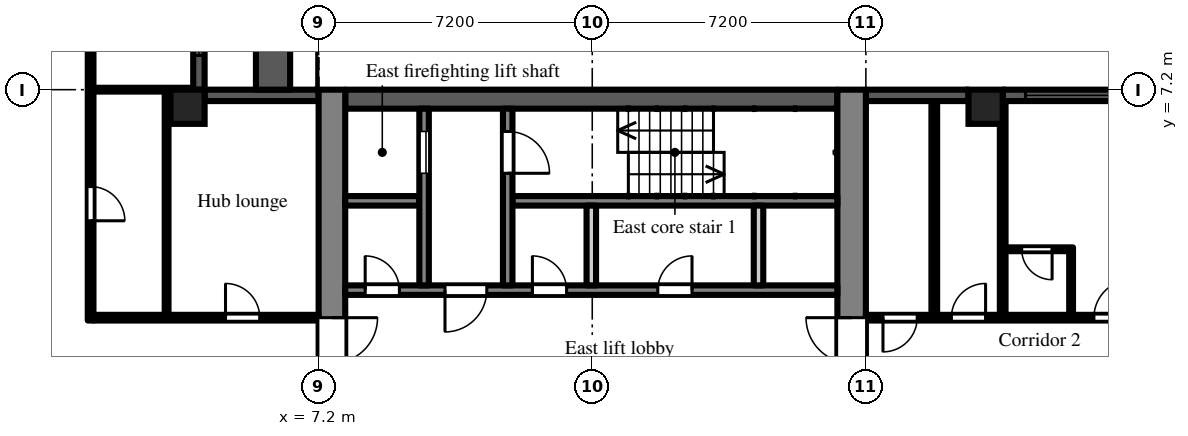
"""IFC4 building model, lengths in metres.
Left out: names, types, materials, properties, quantities, classifications, styles, units other than length and angle.
Written with IfcOpenShell. Run it as: python <this file> out.ifc"""

import sys

from ifc_helpers import new_model, si_unit, direction, frame, frame_2d, origin, origin_2d, place, context, subcontext, project, spatial, rectangle, extrude, element, fill, save


model = new_model("IFC4")
c1 = context("Model", 3, precision=1e-05, world=origin(), true_north=direction((0.0, 1.0)))
c2 = subcontext(c1, "Body", "Model", "MODEL_VIEW")
j1 = project(units=[si_unit("LENGTHUNIT", "METRE"), si_unit("PLANEANGLEUNIT", "RADIAN")], contexts=[c1])
p1 = place(None, origin())
s1 = spatial("IfcSite", under=j1, at=p1, CompositionType="ELEMENT")
p2 = place(p1, origin())
s2 = spatial("IfcBuilding", under=s1, at=p2, CompositionType="ELEMENT")
p3 = place(p2, frame((0.0, 0.0, 75.9)))
s3 = spatial("IfcBuildingStorey", under=s2, at=p3, CompositionType="ELEMENT", Elevation=75.9)
for number, where, z_axis, x_axis in (
    (1, (3.75, 6.75, 0.0), (0.0, 0.0, 1.0), (1.0, 0.0, 0.0)),
    (2, (24.75, 6.75, 0.0), (0.0, 0.0, 1.0), (1.0, 0.0, 0.0)),
):
    element("IfcColumn", number, at=place(p3, frame(where, z_axis=z_axis, x_axis=x_axis)), inside=s3, PredefinedType="COLUMN", context=c2, shape_type="SweptSolid", body=[
        extrude(rectangle(XDim=0.9, YDim=0.9, at=origin_2d()), origin(), (0.0, 0.0, 1.0), 3.0),
    ])
p4 = place(p3, frame((28.35, 7.05, 0.0), z_axis=(0.0, 0.0, 1.0), x_axis=(-1.0, 0.0, 0.0)))
e3 = element("IfcWall", 3, at=p4, inside=s3, PredefinedType="SOLIDWALL", context=c2, shape_type="SweptSolid", body=[
    extrude(rectangle(XDim=3.15, YDim=0.3, at=frame_2d((1.575, 0.0))), origin(), (0.0, 0.0, 1.0), 2.1),
])
p5 = place(p4, frame((0.15, 0.0, 0.2)))
e4 = element("IfcOpeningElement", 4, at=p5, cuts=e3, PredefinedType="OPENING", context=c2, shape_type="SweptSolid", body=[
    extrude(rectangle(XDim=2.4, YDim=1.85, at=frame_2d((1.2, 0.925))), frame((0.0, 0.16, 0.0), z_axis=(0.0, -1.0, 0.0), x_axis=(1.0, 0.0, 0.0)), (0.0, 0.0, 1.0), 0.32),
])
p6 = place(p3, frame((24.3, 7.05, 0.0), z_axis=(0.0, 0.0, 1.0), x_axis=(-1.0, 0.0, 0.0)))
e5 = element("IfcWall", 5, at=p6, inside=s3, PredefinedType="SOLIDWALL", context=c2, shape_type="SweptSolid", body=[
    extrude(rectangle(XDim=2.7, YDim=0.3, at=frame_2d((1.35, 0.0))), origin(), (0.0, 0.0, 1.0), 2.1),
])
p7 = place(p3, frame((7.2, 7.05, 0.0), z_axis=(0.0, 0.0, 1.0), x_axis=(-1.0, 0.0, 0.0)))
e6 = element("IfcWall", 6, at=p7, inside=s3, PredefinedType="SOLIDWALL", context=c2, shape_type="SweptSolid", body=[
    extrude(rectangle(XDim=3.0, YDim=0.3, at=frame_2d((1.5, 0.0))), origin(), (0.0, 0.0, 1.0), 2.1),
])
p8 = place(p3, frame((4.05, 7.2, 0.0), z_axis=(0.0, 0.0, 1.0), x_axis=(0.0, 1.0, 0.0)))
e7 = element("IfcWall", 7, at=p8, inside=s3, PredefinedType="SOLIDWALL", context=c2, shape_type="SweptSolid", body=[
    extrude(rectangle(XDim=7.2, YDim=0.3, at=frame_2d((3.6, 0.0))), origin(), (0.0, 0.0, 1.0), 2.1),
])
p9 = place(p8, frame((3.0, 0.0, 0.0)))
e8 = element("IfcOpeningElement", 8, at=p9, cuts=e7, PredefinedType="OPENING", context=c2, shape_type="SweptSolid", body=[
    extrude(rectangle(XDim=1.2, YDim=2.05, at=frame_2d((0.6, 1.025))), frame((0.0, 0.16, 0.0), z_axis=(0.0, -1.0, 0.0), x_axis=(1.0, 0.0, 0.0)), (0.0, 0.0, 1.0), 0.32),
])
p10 = place(p8, frame((0.9, 0.0, 0.2)))
e9 = element("IfcOpeningElement", 9, at=p10, cuts=e7, PredefinedType="OPENING", context=c2, shape_type="SweptSolid", body=[
    extrude(rectangle(XDim=1.8, YDim=1.85, at=frame_2d((0.9, 0.925))), frame((0.0, 0.16, 0.0), z_axis=(0.0, -1.0, 0.0), x_axis=(1.0, 0.0, 0.0)), (0.0, 0.0, 1.0), 0.32),
])
p11 = place(p8, frame((4.5, 0.0, 0.2)))
e10 = element("IfcOpeningElement", 10, at=p11, cuts=e7, PredefinedType="OPENING", context=c2, shape_type="SweptSolid", body=[
    extrude(rectangle(XDim=1.8, YDim=1.85, at=frame_2d((0.9, 0.925))), frame((0.0, 0.16, 0.0), z_axis=(0.0, -1.0, 0.0), x_axis=(1.0, 0.0, 0.0)), (0.0, 0.0, 1.0), 0.32),
])
p12 = place(p3, frame((6.0, 7.2, 0.0), z_axis=(0.0, 0.0, 1.0), x_axis=(0.0, 1.0, 0.0)))
e11 = element("IfcWall", 11, at=p12, inside=s3, PredefinedType="PARAPET", context=c2, shape_type="SweptSolid", body=[
    extrude(rectangle(XDim=7.2, YDim=0.9, at=frame_2d((3.6, 0.0))), origin(), (0.0, 0.0, 1.0), 0.8),
])
p13 = place(p3, frame((7.55, -7.2, 0.0), z_axis=(0.0, 0.0, 1.0), x_axis=(0.0, 1.0, 0.0)))
e12 = element("IfcWall", 12, at=p13, inside=s3, PredefinedType="SHEAR", context=c2, shape_type="SweptSolid", body=[
    extrude(rectangle(XDim=14.4, YDim=0.7, at=frame_2d((7.2, 0.0))), origin(), (0.0, 0.0, 1.0), 2.575),
])
p14 = place(p13, frame((6.0, 0.0, 0.0)))
e13 = element("IfcOpeningElement", 13, at=p14, cuts=e12, PredefinedType="OPENING", context=c2, shape_type="SweptSolid", body=[
    extrude(rectangle(XDim=2.4, YDim=2.2, at=frame_2d((1.2, 1.1))), frame((0.0, 0.36, 0.0), z_axis=(0.0, -1.0, 0.0), x_axis=(1.0, 0.0, 0.0)), (0.0, 0.0, 1.0), 0.72),
])
p15 = place(p3, frame((21.225, -7.2, 0.0), z_axis=(0.0, 0.0, 1.0), x_axis=(0.0, 1.0, 0.0)))
e14 = element("IfcWall", 14, at=p15, inside=s3, PredefinedType="SHEAR", context=c2, shape_type="SweptSolid", body=[
    extrude(rectangle(XDim=14.4, YDim=0.75, at=frame_2d((7.2, 0.0))), origin(), (0.0, 0.0, 1.0), 2.575),
])
p16 = place(p15, frame((6.0, 0.0, 0.0)))
e15 = element("IfcOpeningElement", 15, at=p16, cuts=e14, PredefinedType="OPENING", context=c2, shape_type="SweptSolid", body=[
    extrude(rectangle(XDim=2.4, YDim=2.2, at=frame_2d((1.2, 1.1))), frame((0.0, 0.385, 0.0), z_axis=(0.0, -1.0, 0.0), x_axis=(1.0, 0.0, 0.0)), (0.0, 0.0, 1.0), 0.77),
])
p17 = place(p3, frame((7.9, 6.95, 0.0), z_axis=(0.0, 0.0, 1.0), x_axis=(1.0, 0.0, 0.0)))
e16 = element("IfcWall", 16, at=p17, inside=s3, PredefinedType="SHEAR", context=c2, shape_type="SweptSolid", body=[
    extrude(rectangle(XDim=12.95, YDim=0.5, at=frame_2d((6.475, 0.0))), origin(), (0.0, 0.0, 1.0), 2.575),
])
p18 = place(p3, frame((7.9, 1.925, 0.0), z_axis=(0.0, 0.0, 1.0), x_axis=(1.0, 0.0, 0.0)))
e17 = element("IfcWall", 17, at=p18, inside=s3, PredefinedType="SHEAR", context=c2, shape_type="SweptSolid", body=[
    extrude(rectangle(XDim=12.95, YDim=0.25, at=frame_2d((6.475, 0.0))), origin(), (0.0, 0.0, 1.0), 2.575),
])
p19 = place(p18, frame((0.525, 0.0, 0.0)))
e18 = element("IfcOpeningElement", 18, at=p19, cuts=e17, PredefinedType="OPENING", context=c2, shape_type="SweptSolid", body=[
    extrude(rectangle(XDim=0.9, YDim=2.1, at=frame_2d((0.45, 1.05))), frame((0.0, 0.135, 0.0), z_axis=(0.0, -1.0, 0.0), x_axis=(1.0, 0.0, 0.0)), (0.0, 0.0, 1.0), 0.27),
])
p20 = place(p18, frame((2.625, 0.0, 0.0)))
e19 = element("IfcOpeningElement", 19, at=p20, cuts=e17, PredefinedType="OPENING", context=c2, shape_type="SweptSolid", body=[
    extrude(rectangle(XDim=1.1, YDim=2.1, at=frame_2d((0.55, 1.05))), frame((0.0, 0.135, 0.0), z_axis=(0.0, -1.0, 0.0), x_axis=(1.0, 0.0, 0.0)), (0.0, 0.0, 1.0), 0.27),
])
p21 = place(p18, frame((4.925, 0.0, 0.0)))
e20 = element("IfcOpeningElement", 20, at=p21, cuts=e17, PredefinedType="OPENING", context=c2, shape_type="SweptSolid", body=[
    extrude(rectangle(XDim=0.9, YDim=2.1, at=frame_2d((0.45, 1.05))), frame((0.0, 0.135, 0.0), z_axis=(0.0, -1.0, 0.0), x_axis=(1.0, 0.0, 0.0)), (0.0, 0.0, 1.0), 0.27),
])
p22 = place(p18, frame((8.225, 0.0, 0.0)))
e21 = element("IfcOpeningElement", 21, at=p22, cuts=e17, PredefinedType="OPENING", context=c2, shape_type="SweptSolid", body=[
    extrude(rectangle(XDim=0.9, YDim=2.1, at=frame_2d((0.45, 1.05))), frame((0.0, 0.135, 0.0), z_axis=(0.0, -1.0, 0.0), x_axis=(1.0, 0.0, 0.0)), (0.0, 0.0, 1.0), 0.27),
])
p23 = place(p3, frame((7.9, 4.275, 0.0), z_axis=(0.0, 0.0, 1.0), x_axis=(1.0, 0.0, 0.0)))
e22 = element("IfcWall", 22, at=p23, inside=s3, PredefinedType="SHEAR", context=c2, shape_type="SweptSolid", body=[
    extrude(rectangle(XDim=1.95, YDim=0.25, at=frame_2d((0.975, 0.0))), origin(), (0.0, 0.0, 1.0), 2.575),
])
p24 = place(p3, frame((12.3, 4.275, 0.0), z_axis=(0.0, 0.0, 1.0), x_axis=(1.0, 0.0, 0.0)))
e23 = element("IfcWall", 23, at=p24, inside=s3, PredefinedType="SHEAR", context=c2, shape_type="SweptSolid", body=[
    extrude(rectangle(XDim=8.55, YDim=0.25, at=frame_2d((4.275, 0.0))), origin(), (0.0, 0.0, 1.0), 2.575),
])
p25 = place(p3, frame((9.975, 2.05, 0.0), z_axis=(0.0, 0.0, 1.0), x_axis=(0.0, 1.0, 0.0)))
e24 = element("IfcWall", 24, at=p25, inside=s3, PredefinedType="SHEAR", context=c2, shape_type="SweptSolid", body=[
    extrude(rectangle(XDim=4.65, YDim=0.25, at=frame_2d((2.325, 0.0))), origin(), (0.0, 0.0, 1.0), 2.575),
])
p26 = place(p25, frame((2.95, 0.0, 0.0)))
e25 = element("IfcOpeningElement", 25, at=p26, cuts=e24, PredefinedType="OPENING", context=c2, shape_type="SweptSolid", body=[
    extrude(rectangle(XDim=1.1, YDim=2.1, at=frame_2d((0.55, 1.05))), frame((0.0, 0.135, 0.0), z_axis=(0.0, -1.0, 0.0), x_axis=(1.0, 0.0, 0.0)), (0.0, 0.0, 1.0), 0.27),
])
p27 = place(p3, frame((12.175, 2.05, 0.0), z_axis=(0.0, 0.0, 1.0), x_axis=(0.0, 1.0, 0.0)))
e26 = element("IfcWall", 26, at=p27, inside=s3, PredefinedType="SHEAR", context=c2, shape_type="SweptSolid", body=[
    extrude(rectangle(XDim=4.65, YDim=0.25, at=frame_2d((2.325, 0.0))), origin(), (0.0, 0.0, 1.0), 2.575),
])
p28 = place(p27, frame((2.95, 0.0, 0.0)))
e27 = element("IfcOpeningElement", 27, at=p28, cuts=e26, PredefinedType="OPENING", context=c2, shape_type="SweptSolid", body=[
    extrude(rectangle(XDim=1.1, YDim=2.1, at=frame_2d((0.55, 1.05))), frame((0.0, 0.135, 0.0), z_axis=(0.0, -1.0, 0.0), x_axis=(1.0, 0.0, 0.0)), (0.0, 0.0, 1.0), 0.27),
])
for number, where, z_axis, x_axis in (
    (28, (14.375, 2.05, 0.0), (0.0, 0.0, 1.0), (0.0, 1.0, 0.0)),
    (29, (18.775, 2.05, 0.0), (0.0, 0.0, 1.0), (0.0, 1.0, 0.0)),
):
    element("IfcWall", number, at=place(p3, frame(where, z_axis=z_axis, x_axis=x_axis)), inside=s3, PredefinedType="PARTITIONING", context=c2, shape_type="SweptSolid", body=[
        extrude(rectangle(XDim=2.1, YDim=0.25, at=frame_2d((1.05, 0.0))), origin(), (0.0, 0.0, 1.0), 2.575),
    ])
p29 = place(p3, frame((1.2, 1.125, 0.0), z_axis=(0.0, 0.0, 1.0), x_axis=(0.0, 1.0, 0.0)))
e30 = element("IfcWall", 30, at=p29, inside=s3, PredefinedType="PARTITIONING", context=c2, shape_type="SweptSolid", body=[
    extrude(rectangle(XDim=20.175, YDim=0.15, at=frame_2d((10.087, 0.0))), origin(), (0.0, 0.0, 1.0), 2.575),
])
p30 = place(p29, frame((2.625, 0.0, 0.0)))
e31 = element("IfcOpeningElement", 31, at=p30, cuts=e30, PredefinedType="OPENING", context=c2, shape_type="SweptSolid", body=[
    extrude(rectangle(XDim=0.9, YDim=2.1, at=frame_2d((0.45, 1.05))), frame((0.0, 0.085, 0.0), z_axis=(0.0, -1.0, 0.0), x_axis=(1.0, 0.0, 0.0)), (0.0, 0.0, 1.0), 0.17),
])
p31 = place(p29, frame((7.425, 0.0, 0.0)))
e32 = element("IfcOpeningElement", 32, at=p31, cuts=e30, PredefinedType="OPENING", context=c2, shape_type="SweptSolid", body=[
    extrude(rectangle(XDim=0.9, YDim=2.1, at=frame_2d((0.45, 1.05))), frame((0.0, 0.085, 0.0), z_axis=(0.0, -1.0, 0.0), x_axis=(1.0, 0.0, 0.0)), (0.0, 0.0, 1.0), 0.17),
])
p32 = place(p29, frame((15.825, 0.0, 0.0)))
e33 = element("IfcOpeningElement", 33, at=p32, cuts=e30, PredefinedType="OPENING", context=c2, shape_type="SweptSolid", body=[
    extrude(rectangle(XDim=1.8, YDim=2.1, at=frame_2d((0.9, 1.05))), frame((0.0, 0.085, 0.0), z_axis=(0.0, -1.0, 0.0), x_axis=(1.0, 0.0, 0.0)), (0.0, 0.0, 1.0), 0.17),
])
p33 = place(p3, frame((1.275, 1.2, 0.0), z_axis=(0.0, 0.0, 1.0), x_axis=(1.0, 0.0, 0.0)))
e34 = element("IfcWall", 34, at=p33, inside=s3, PredefinedType="PARTITIONING", context=c2, shape_type="SweptSolid", body=[
    extrude(rectangle(XDim=5.925, YDim=0.15, at=frame_2d((2.962, 0.0))), origin(), (0.0, 0.0, 1.0), 2.575),
])
p34 = place(p33, frame((3.475, 0.0, 0.0)))
e35 = element("IfcOpeningElement", 35, at=p34, cuts=e34, PredefinedType="OPENING", context=c2, shape_type="SweptSolid", body=[
    extrude(rectangle(XDim=0.9, YDim=2.1, at=frame_2d((0.45, 1.05))), frame((0.0, 0.085, 0.0), z_axis=(0.0, -1.0, 0.0), x_axis=(1.0, 0.0, 0.0)), (0.0, 0.0, 1.0), 0.17),
])
p35 = place(p3, frame((1.275, 7.2, 0.0), z_axis=(0.0, 0.0, 1.0), x_axis=(1.0, 0.0, 0.0)))
e36 = element("IfcWall", 36, at=p35, inside=s3, PredefinedType="PARTITIONING", context=c2, shape_type="SweptSolid", body=[
    extrude(rectangle(XDim=2.625, YDim=0.1, at=frame_2d((1.312, 0.0))), origin(), (0.0, 0.0, 1.0), 2.575),
])
p36 = place(p3, frame((3.2, 1.275, 0.0), z_axis=(0.0, 0.0, 1.0), x_axis=(0.0, 1.0, 0.0)))
e37 = element("IfcWall", 37, at=p36, inside=s3, PredefinedType="PARTITIONING", context=c2, shape_type="SweptSolid", body=[
    extrude(rectangle(XDim=5.875, YDim=0.1, at=frame_2d((2.938, 0.0))), origin(), (0.0, 0.0, 1.0), 2.575),
])
p37 = place(p3, frame((21.6, 1.2, 0.0), z_axis=(0.0, 0.0, 1.0), x_axis=(1.0, 0.0, 0.0)))
e38 = element("IfcWall", 38, at=p37, inside=s3, PredefinedType="PARTITIONING", context=c2, shape_type="SweptSolid", body=[
    extrude(rectangle(XDim=14.9, YDim=0.15, at=frame_2d((7.45, 0.0))), origin(), (0.0, 0.0, 1.0), 2.575),
])
p38 = place(p37, frame((0.45, 0.0, 0.0)))
e39 = element("IfcOpeningElement", 39, at=p38, cuts=e38, PredefinedType="OPENING", context=c2, shape_type="SweptSolid", body=[
    extrude(rectangle(XDim=0.9, YDim=2.1, at=frame_2d((0.45, 1.05))), frame((0.0, 0.085, 0.0), z_axis=(0.0, -1.0, 0.0), x_axis=(1.0, 0.0, 0.0)), (0.0, 0.0, 1.0), 0.17),
])
p39 = place(p37, frame((2.25, 0.0, 0.0)))
e40 = element("IfcOpeningElement", 40, at=p39, cuts=e38, PredefinedType="OPENING", context=c2, shape_type="SweptSolid", body=[
    extrude(rectangle(XDim=0.9, YDim=2.1, at=frame_2d((0.45, 1.05))), frame((0.0, 0.085, 0.0), z_axis=(0.0, -1.0, 0.0), x_axis=(1.0, 0.0, 0.0)), (0.0, 0.0, 1.0), 0.17),
])
p40 = place(p37, frame((6.0, 0.0, 0.0)))
e41 = element("IfcOpeningElement", 41, at=p40, cuts=e38, PredefinedType="OPENING", context=c2, shape_type="SweptSolid", body=[
    extrude(rectangle(XDim=1.0, YDim=2.1, at=frame_2d((0.5, 1.05))), frame((0.0, 0.085, 0.0), z_axis=(0.0, -1.0, 0.0), x_axis=(1.0, 0.0, 0.0)), (0.0, 0.0, 1.0), 0.17),
])
p41 = place(p37, frame((8.55, 0.0, 0.0)))
e42 = element("IfcOpeningElement", 42, at=p41, cuts=e38, PredefinedType="OPENING", context=c2, shape_type="SweptSolid", body=[
    extrude(rectangle(XDim=0.9, YDim=2.1, at=frame_2d((0.45, 1.05))), frame((0.0, 0.085, 0.0), z_axis=(0.0, -1.0, 0.0), x_axis=(1.0, 0.0, 0.0)), (0.0, 0.0, 1.0), 0.17),
])
p42 = place(p37, frame((11.95, 0.0, 0.0)))
e43 = element("IfcOpeningElement", 43, at=p42, cuts=e38, PredefinedType="OPENING", context=c2, shape_type="SweptSolid", body=[
    extrude(rectangle(XDim=1.8, YDim=2.1, at=frame_2d((0.9, 1.05))), frame((0.0, 0.085, 0.0), z_axis=(0.0, -1.0, 0.0), x_axis=(1.0, 0.0, 0.0)), (0.0, 0.0, 1.0), 0.17),
])
for number, where, z_axis, x_axis in (
    (44, (23.4, 1.275, 0.0), (0.0, 0.0, 1.0), (0.0, 1.0, 0.0)),
    (45, (25.2, 1.275, 0.0), (0.0, 0.0, 1.0), (0.0, 1.0, 0.0)),
):
    element("IfcWall", number, at=place(p3, frame(where, z_axis=z_axis, x_axis=x_axis)), inside=s3, PredefinedType="PARTITIONING", context=c2, shape_type="SweptSolid", body=[
        extrude(rectangle(XDim=5.625, YDim=0.15, at=frame_2d((2.812, 0.0))), origin(), (0.0, 0.0, 1.0), 2.575),
    ])
p43 = place(p3, frame((25.275, 3.0, 0.0), z_axis=(0.0, 0.0, 1.0), x_axis=(1.0, 0.0, 0.0)))
e46 = element("IfcWall", 46, at=p43, inside=s3, PredefinedType="PARTITIONING", context=c2, shape_type="SweptSolid", body=[
    extrude(rectangle(XDim=1.775, YDim=0.1, at=frame_2d((0.888, 0.0))), origin(), (0.0, 0.0, 1.0), 2.575),
])
p44 = place(p43, frame((0.425, 0.0, 0.0)))
e47 = element("IfcOpeningElement", 47, at=p44, cuts=e46, PredefinedType="OPENING", context=c2, shape_type="SweptSolid", body=[
    extrude(rectangle(XDim=0.8, YDim=2.1, at=frame_2d((0.4, 1.05))), frame((0.0, 0.06, 0.0), z_axis=(0.0, -1.0, 0.0), x_axis=(1.0, 0.0, 0.0)), (0.0, 0.0, 1.0), 0.12),
])
p45 = place(p3, frame((27.0, 1.275, 0.0), z_axis=(0.0, 0.0, 1.0), x_axis=(0.0, 1.0, 0.0)))
e48 = element("IfcWall", 48, at=p45, inside=s3, PredefinedType="PARTITIONING", context=c2, shape_type="SweptSolid", body=[
    extrude(rectangle(XDim=1.675, YDim=0.1, at=frame_2d((0.837, 0.0))), origin(), (0.0, 0.0, 1.0), 2.575),
])
p46 = place(p5, origin())
e49 = element("IfcWindow", 49, at=p46, inside=s3, PartitioningType="SINGLE_PANEL", PredefinedType="WINDOW", context=c2, shape_type="SweptSolid", body=[
    extrude(rectangle(XDim=2.4, YDim=1.85, at=frame_2d((1.2, 0.925))), frame((0.0, 0.03, 0.0), z_axis=(0.0, -1.0, 0.0), x_axis=(1.0, 0.0, 0.0)), (0.0, 0.0, 1.0), 0.06),
])
fill(e4, e49)
p47 = place(p10, origin())
e50 = element("IfcWindow", 50, at=p47, inside=s3, PartitioningType="SINGLE_PANEL", PredefinedType="WINDOW", context=c2, shape_type="SweptSolid", body=[
    extrude(rectangle(XDim=1.8, YDim=1.85, at=frame_2d((0.9, 0.925))), frame((0.0, 0.03, 0.0), z_axis=(0.0, -1.0, 0.0), x_axis=(1.0, 0.0, 0.0)), (0.0, 0.0, 1.0), 0.06),
])
fill(e9, e50)
p48 = place(p26, origin())
e51 = element("IfcDoor", 51, at=p48, inside=s3, OperationType="SLIDING_TO_LEFT", PredefinedType="DOOR", context=c2, shape_type="SweptSolid", body=[
    extrude(rectangle(XDim=1.1, YDim=2.1, at=frame_2d((0.55, 1.05))), frame((0.0, 0.025, 0.0), z_axis=(0.0, -1.0, 0.0), x_axis=(1.0, 0.0, 0.0)), (0.0, 0.0, 1.0), 0.05),
])
fill(e25, e51)
p49 = place(p28, frame((1.1, 0.0, 0.0), z_axis=(0.0, 0.0, 1.0), x_axis=(-1.0, 0.0, 0.0)))
e52 = element("IfcDoor", 52, at=p49, inside=s3, OperationType="SINGLE_SWING_RIGHT", PredefinedType="DOOR", context=c2, shape_type="SweptSolid", body=[
    extrude(rectangle(XDim=1.1, YDim=2.1, at=frame_2d((0.55, 1.05))), frame((0.0, 0.025, 0.0), z_axis=(0.0, -1.0, 0.0), x_axis=(1.0, 0.0, 0.0)), (0.0, 0.0, 1.0), 0.05),
])
fill(e27, e52)
p50 = place(p19, origin())
e53 = element("IfcDoor", 53, at=p50, inside=s3, OperationType="SINGLE_SWING_LEFT", PredefinedType="DOOR", context=c2, shape_type="SweptSolid", body=[
    extrude(rectangle(XDim=0.9, YDim=2.1, at=frame_2d((0.45, 1.05))), frame((0.0, 0.025, 0.0), z_axis=(0.0, -1.0, 0.0), x_axis=(1.0, 0.0, 0.0)), (0.0, 0.0, 1.0), 0.05),
])
fill(e18, e53)
p51 = place(p20, frame((1.1, 0.0, 0.0), z_axis=(0.0, 0.0, 1.0), x_axis=(-1.0, 0.0, 0.0)))
e54 = element("IfcDoor", 54, at=p51, inside=s3, OperationType="SINGLE_SWING_RIGHT", PredefinedType="DOOR", context=c2, shape_type="SweptSolid", body=[
    extrude(rectangle(XDim=1.1, YDim=2.1, at=frame_2d((0.55, 1.05))), frame((0.0, 0.025, 0.0), z_axis=(0.0, -1.0, 0.0), x_axis=(1.0, 0.0, 0.0)), (0.0, 0.0, 1.0), 0.05),
])
fill(e19, e54)
p52 = place(p14, frame((2.4, 0.0, 0.0), z_axis=(0.0, 0.0, 1.0), x_axis=(-1.0, 0.0, 0.0)))
e55 = element("IfcDoor", 55, at=p52, inside=s3, OperationType="DOUBLE_DOOR_DOUBLE_SWING", PredefinedType="DOOR", context=c2, shape_type="SweptSolid", body=[
    extrude(rectangle(XDim=2.4, YDim=2.2, at=frame_2d((1.2, 1.1))), frame((0.0, 0.025, 0.0), z_axis=(0.0, -1.0, 0.0), x_axis=(1.0, 0.0, 0.0)), (0.0, 0.0, 1.0), 0.05),
])
fill(e13, e55)
p53 = place(p16, origin())
e56 = element("IfcDoor", 56, at=p53, inside=s3, OperationType="DOUBLE_DOOR_DOUBLE_SWING", PredefinedType="DOOR", context=c2, shape_type="SweptSolid", body=[
    extrude(rectangle(XDim=2.4, YDim=2.2, at=frame_2d((1.2, 1.1))), frame((0.0, 0.025, 0.0), z_axis=(0.0, -1.0, 0.0), x_axis=(1.0, 0.0, 0.0)), (0.0, 0.0, 1.0), 0.05),
])
fill(e15, e56)
p54 = place(p21, origin())
e57 = element("IfcDoor", 57, at=p54, inside=s3, OperationType="SINGLE_SWING_LEFT", PredefinedType="DOOR", context=c2, shape_type="SweptSolid", body=[
    extrude(rectangle(XDim=0.9, YDim=2.1, at=frame_2d((0.45, 1.05))), frame((0.0, 0.025, 0.0), z_axis=(0.0, -1.0, 0.0), x_axis=(1.0, 0.0, 0.0)), (0.0, 0.0, 1.0), 0.05),
])
fill(e20, e57)
p55 = place(p22, origin())
e58 = element("IfcDoor", 58, at=p55, inside=s3, OperationType="SINGLE_SWING_RIGHT", PredefinedType="DOOR", context=c2, shape_type="SweptSolid", body=[
    extrude(rectangle(XDim=0.9, YDim=2.1, at=frame_2d((0.45, 1.05))), frame((0.0, 0.025, 0.0), z_axis=(0.0, -1.0, 0.0), x_axis=(1.0, 0.0, 0.0)), (0.0, 0.0, 1.0), 0.05),
])
fill(e21, e58)
p56 = place(p30, frame((0.9, 0.0, 0.0), z_axis=(0.0, 0.0, 1.0), x_axis=(-1.0, 0.0, 0.0)))
e59 = element("IfcDoor", 59, at=p56, inside=s3, OperationType="SINGLE_SWING_RIGHT", PredefinedType="DOOR", context=c2, shape_type="SweptSolid", body=[
    extrude(rectangle(XDim=0.9, YDim=2.1, at=frame_2d((0.45, 1.05))), frame((0.0, 0.025, 0.0), z_axis=(0.0, -1.0, 0.0), x_axis=(1.0, 0.0, 0.0)), (0.0, 0.0, 1.0), 0.05),
])
fill(e31, e59)
p57 = place(p34, origin())
e60 = element("IfcDoor", 60, at=p57, inside=s3, OperationType="SINGLE_SWING_LEFT", PredefinedType="DOOR", context=c2, shape_type="SweptSolid", body=[
    extrude(rectangle(XDim=0.9, YDim=2.1, at=frame_2d((0.45, 1.05))), frame((0.0, 0.025, 0.0), z_axis=(0.0, -1.0, 0.0), x_axis=(1.0, 0.0, 0.0)), (0.0, 0.0, 1.0), 0.05),
])
fill(e35, e60)
p58 = place(p38, frame((0.9, 0.0, 0.0), z_axis=(0.0, 0.0, 1.0), x_axis=(-1.0, 0.0, 0.0)))
e61 = element("IfcDoor", 61, at=p58, inside=s3, OperationType="SINGLE_SWING_RIGHT", PredefinedType="DOOR", context=c2, shape_type="SweptSolid", body=[
    extrude(rectangle(XDim=0.9, YDim=2.1, at=frame_2d((0.45, 1.05))), frame((0.0, 0.025, 0.0), z_axis=(0.0, -1.0, 0.0), x_axis=(1.0, 0.0, 0.0)), (0.0, 0.0, 1.0), 0.05),
])
fill(e39, e61)
p59 = place(p39, origin())
e62 = element("IfcDoor", 62, at=p59, inside=s3, OperationType="SINGLE_SWING_RIGHT", PredefinedType="DOOR", context=c2, shape_type="SweptSolid", body=[
    extrude(rectangle(XDim=0.9, YDim=2.1, at=frame_2d((0.45, 1.05))), frame((0.0, 0.025, 0.0), z_axis=(0.0, -1.0, 0.0), x_axis=(1.0, 0.0, 0.0)), (0.0, 0.0, 1.0), 0.05),
])
fill(e40, e62)
p60 = place(p44, frame((0.8, 0.0, 0.0), z_axis=(0.0, 0.0, 1.0), x_axis=(-1.0, 0.0, 0.0)))
e63 = element("IfcDoor", 63, at=p60, inside=s3, OperationType="SINGLE_SWING_LEFT", PredefinedType="DOOR", context=c2, shape_type="SweptSolid", body=[
    extrude(rectangle(XDim=0.8, YDim=2.1, at=frame_2d((0.4, 1.05))), frame((0.0, 0.025, 0.0), z_axis=(0.0, -1.0, 0.0), x_axis=(1.0, 0.0, 0.0)), (0.0, 0.0, 1.0), 0.05),
])
fill(e47, e63)
p61 = place(p40, origin())
e64 = element("IfcDoor", 64, at=p61, inside=s3, OperationType="SINGLE_SWING_RIGHT", PredefinedType="DOOR", context=c2, shape_type="SweptSolid", body=[
    extrude(rectangle(XDim=1.0, YDim=2.1, at=frame_2d((0.5, 1.05))), frame((0.0, 0.025, 0.0), z_axis=(0.0, -1.0, 0.0), x_axis=(1.0, 0.0, 0.0)), (0.0, 0.0, 1.0), 0.05),
])
fill(e41, e64)
save(model, sys.argv[1])
